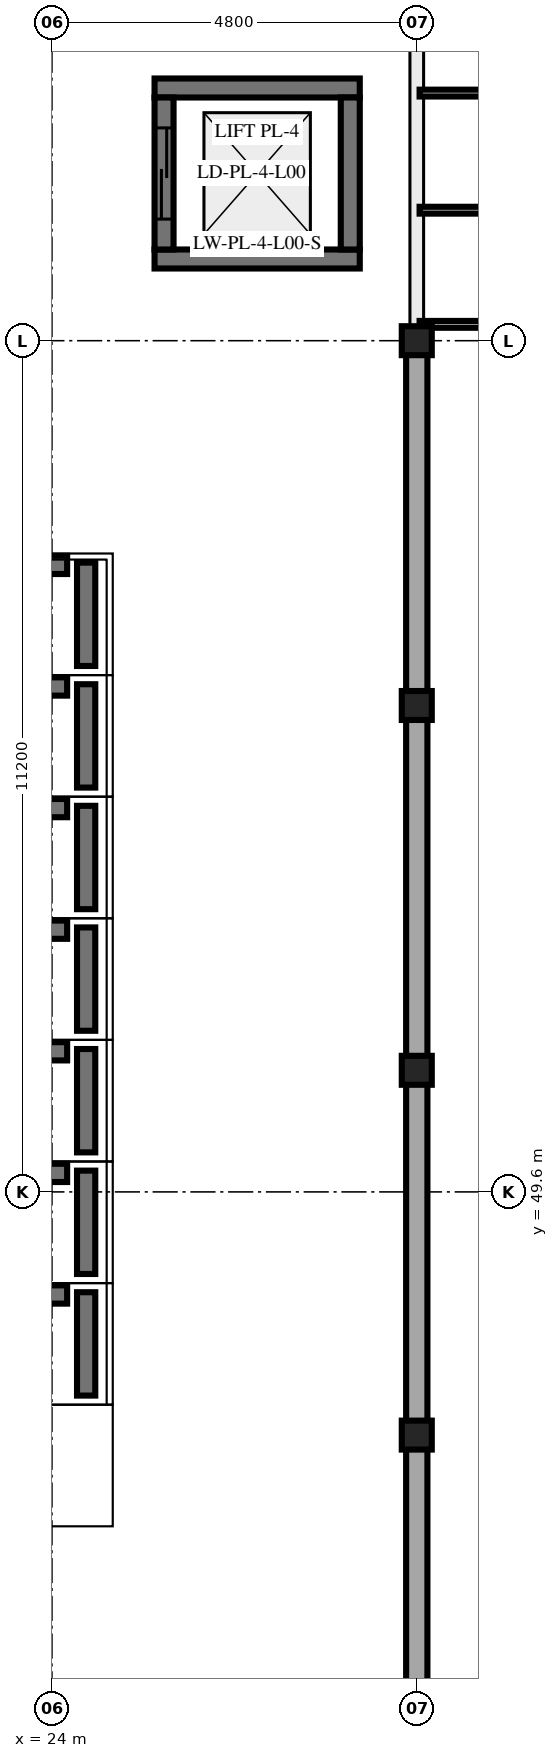
"""IFC4 building model, lengths in metres.
Left out: names, types, materials, properties, quantities, classifications, styles, units other than length and angle.
Written with IfcOpenShell. Run it as: python <this file> out.ifc"""

import sys

from ifc_helpers import new_model, si_unit, direction, frame, frame_2d, origin, origin_2d, place, context, subcontext, project, spatial, rectangle, i_section, extrude, element, fill, save


model = new_model("IFC4")
c1 = context("Model", 3, precision=1e-05, world=origin(), true_north=direction((0.0, 1.0)))
c2 = subcontext(c1, "Body", "Model", "MODEL_VIEW")
j1 = project(units=[si_unit("LENGTHUNIT", "METRE"), si_unit("PLANEANGLEUNIT", "RADIAN")], contexts=[c1])
p1 = place(None, origin())
s1 = spatial("IfcSite", under=j1, at=p1, CompositionType="ELEMENT")
p2 = place(p1, origin())
s2 = spatial("IfcBuilding", under=s1, at=p2, CompositionType="ELEMENT")
p3 = place(p2, origin())
s3 = spatial("IfcBuildingStorey", under=s2, at=p3, CompositionType="ELEMENT", Elevation=0.0)
for number, where, z_axis, x_axis in (
    (1, (28.8, 46.4, 0.0), (0.0, 0.0, 1.0), (1.0, 0.0, 0.0)),
    (2, (28.8, 51.2, 0.0), (0.0, 0.0, 1.0), (1.0, 0.0, 0.0)),
    (3, (28.8, 56.0, 0.0), (0.0, 0.0, 1.0), (1.0, 0.0, 0.0)),
    (4, (28.8, 60.8, 0.0), (0.0, 0.0, 1.0), (1.0, 0.0, 0.0)),
):
    element("IfcColumn", number, at=place(p3, frame(where, z_axis=z_axis, x_axis=x_axis)), inside=s3, PredefinedType="COLUMN", context=c2, shape_type="SweptSolid", body=[
        extrude(i_section(OverallWidth=0.395, OverallDepth=0.381, WebThickness=0.018, FlangeThickness=0.03, at=origin_2d()), origin(), (0.0, 0.0, 1.0), 5.1),
    ])
p4 = place(p3, frame((24.45, 46.92, 0.0), z_axis=(0.0, 0.0, 1.0), x_axis=(0.0, 1.0, 0.0)))
e5 = element("IfcWall", 5, at=p4, inside=s3, PredefinedType="SHEAR", context=c2, shape_type="SweptSolid", body=[
    extrude(rectangle(XDim=1.36, YDim=0.24, at=frame_2d((0.68, 0.0))), origin(), (0.0, 0.0, 1.0), 0.49),
])
p5 = place(p3, frame((4.6, 48.25, 0.0), z_axis=(0.0, 0.0, 1.0), x_axis=(1.0, 0.0, 0.0)))
e6 = element("IfcWall", 6, at=p5, inside=s3, PredefinedType="SHEAR", context=c2, shape_type="SweptSolid", body=[
    extrude(rectangle(XDim=19.6, YDim=0.24, at=frame_2d((9.8, 0.0))), origin(), (0.0, 0.0, 1.0), 0.49),
])
p6 = place(p3, frame((24.45, 48.52, 0.0), z_axis=(0.0, 0.0, 1.0), x_axis=(0.0, 1.0, 0.0)))
e7 = element("IfcWall", 7, at=p6, inside=s3, PredefinedType="SHEAR", context=c2, shape_type="SweptSolid", body=[
    extrude(rectangle(XDim=1.36, YDim=0.24, at=frame_2d((0.68, 0.0))), origin(), (0.0, 0.0, 1.0), 0.81),
])
p7 = place(p3, frame((4.6, 49.85, 0.0), z_axis=(0.0, 0.0, 1.0), x_axis=(1.0, 0.0, 0.0)))
e8 = element("IfcWall", 8, at=p7, inside=s3, PredefinedType="SHEAR", context=c2, shape_type="SweptSolid", body=[
    extrude(rectangle(XDim=19.6, YDim=0.24, at=frame_2d((9.8, 0.0))), origin(), (0.0, 0.0, 1.0), 0.81),
])
p8 = place(p3, frame((24.45, 50.12, 0.0), z_axis=(0.0, 0.0, 1.0), x_axis=(0.0, 1.0, 0.0)))
e9 = element("IfcWall", 9, at=p8, inside=s3, PredefinedType="SHEAR", context=c2, shape_type="SweptSolid", body=[
    extrude(rectangle(XDim=1.36, YDim=0.24, at=frame_2d((0.68, 0.0))), origin(), (0.0, 0.0, 1.0), 1.13),
])
p9 = place(p3, frame((4.6, 51.45, 0.0), z_axis=(0.0, 0.0, 1.0), x_axis=(1.0, 0.0, 0.0)))
e10 = element("IfcWall", 10, at=p9, inside=s3, PredefinedType="SHEAR", context=c2, shape_type="SweptSolid", body=[
    extrude(rectangle(XDim=19.6, YDim=0.24, at=frame_2d((9.8, 0.0))), origin(), (0.0, 0.0, 1.0), 1.13),
])
p10 = place(p3, frame((24.45, 51.72, 0.0), z_axis=(0.0, 0.0, 1.0), x_axis=(0.0, 1.0, 0.0)))
e11 = element("IfcWall", 11, at=p10, inside=s3, PredefinedType="SHEAR", context=c2, shape_type="SweptSolid", body=[
    extrude(rectangle(XDim=1.36, YDim=0.24, at=frame_2d((0.68, 0.0))), origin(), (0.0, 0.0, 1.0), 1.45),
])
p11 = place(p3, frame((4.6, 53.05, 0.0), z_axis=(0.0, 0.0, 1.0), x_axis=(1.0, 0.0, 0.0)))
e12 = element("IfcWall", 12, at=p11, inside=s3, PredefinedType="SHEAR", context=c2, shape_type="SweptSolid", body=[
    extrude(rectangle(XDim=19.6, YDim=0.24, at=frame_2d((9.8, 0.0))), origin(), (0.0, 0.0, 1.0), 1.45),
])
p12 = place(p3, frame((24.45, 53.32, 0.0), z_axis=(0.0, 0.0, 1.0), x_axis=(0.0, 1.0, 0.0)))
e13 = element("IfcWall", 13, at=p12, inside=s3, PredefinedType="SHEAR", context=c2, shape_type="SweptSolid", body=[
    extrude(rectangle(XDim=1.36, YDim=0.24, at=frame_2d((0.68, 0.0))), origin(), (0.0, 0.0, 1.0), 1.77),
])
p13 = place(p3, frame((4.6, 54.65, 0.0), z_axis=(0.0, 0.0, 1.0), x_axis=(1.0, 0.0, 0.0)))
e14 = element("IfcWall", 14, at=p13, inside=s3, PredefinedType="SHEAR", context=c2, shape_type="SweptSolid", body=[
    extrude(rectangle(XDim=19.6, YDim=0.24, at=frame_2d((9.8, 0.0))), origin(), (0.0, 0.0, 1.0), 1.77),
])
p14 = place(p3, frame((24.45, 54.92, 0.0), z_axis=(0.0, 0.0, 1.0), x_axis=(0.0, 1.0, 0.0)))
e15 = element("IfcWall", 15, at=p14, inside=s3, PredefinedType="SHEAR", context=c2, shape_type="SweptSolid", body=[
    extrude(rectangle(XDim=1.36, YDim=0.24, at=frame_2d((0.68, 0.0))), origin(), (0.0, 0.0, 1.0), 2.09),
])
p15 = place(p3, frame((4.6, 56.25, 0.0), z_axis=(0.0, 0.0, 1.0), x_axis=(1.0, 0.0, 0.0)))
e16 = element("IfcWall", 16, at=p15, inside=s3, PredefinedType="SHEAR", context=c2, shape_type="SweptSolid", body=[
    extrude(rectangle(XDim=19.6, YDim=0.24, at=frame_2d((9.8, 0.0))), origin(), (0.0, 0.0, 1.0), 2.09),
])
p16 = place(p3, frame((24.45, 56.52, 0.0), z_axis=(0.0, 0.0, 1.0), x_axis=(0.0, 1.0, 0.0)))
e17 = element("IfcWall", 17, at=p16, inside=s3, PredefinedType="SHEAR", context=c2, shape_type="SweptSolid", body=[
    extrude(rectangle(XDim=1.36, YDim=0.24, at=frame_2d((0.68, 0.0))), origin(), (0.0, 0.0, 1.0), 2.41),
])
p17 = place(p3, frame((4.6, 57.85, 0.0), z_axis=(0.0, 0.0, 1.0), x_axis=(1.0, 0.0, 0.0)))
e18 = element("IfcWall", 18, at=p17, inside=s3, PredefinedType="SHEAR", context=c2, shape_type="SweptSolid", body=[
    extrude(rectangle(XDim=19.6, YDim=0.24, at=frame_2d((9.8, 0.0))), origin(), (0.0, 0.0, 1.0), 2.41),
])
for number, where, z_axis, x_axis in (
    (19, (28.05, 61.875, 0.0), (0.0, 0.0, 1.0), (-1.0, 0.0, 0.0)),
    (20, (25.35, 64.125, 0.0), (0.0, 0.0, 1.0), (1.0, 0.0, 0.0)),
):
    element("IfcWall", number, at=place(p3, frame(where, z_axis=z_axis, x_axis=x_axis)), inside=s3, PredefinedType="SHEAR", context=c2, shape_type="SweptSolid", body=[
        extrude(rectangle(XDim=2.7, YDim=0.25, at=frame_2d((1.35, 0.0))), origin(), (0.0, 0.0, 1.0), 4.88),
    ])
p18 = place(p3, frame((25.475, 62.0, 0.0), z_axis=(0.0, 0.0, 1.0), x_axis=(0.0, 1.0, 0.0)))
e21 = element("IfcWall", 21, at=p18, inside=s3, PredefinedType="SHEAR", context=c2, shape_type="SweptSolid", body=[
    extrude(rectangle(XDim=2.0, YDim=0.25, at=frame_2d((1.0, 0.0))), origin(), (0.0, 0.0, 1.0), 4.88),
])
p19 = place(p18, frame((0.4, 0.0, 0.0)))
e22 = element("IfcOpeningElement", 22, at=p19, cuts=e21, PredefinedType="OPENING", context=c2, shape_type="SweptSolid", body=[
    extrude(rectangle(XDim=1.2, YDim=2.2, at=frame_2d((0.6, 1.1))), frame((0.0, 0.135, 0.0), z_axis=(0.0, -1.0, 0.0), x_axis=(1.0, 0.0, 0.0)), (0.0, 0.0, 1.0), 0.27),
])
p20 = place(p3, frame((27.925, 64.0, 0.0), z_axis=(0.0, 0.0, 1.0), x_axis=(0.0, -1.0, 0.0)))
e23 = element("IfcWall", 23, at=p20, inside=s3, PredefinedType="SHEAR", context=c2, shape_type="SweptSolid", body=[
    extrude(rectangle(XDim=2.0, YDim=0.25, at=frame_2d((1.0, 0.0))), origin(), (0.0, 0.0, 1.0), 4.88),
])
p21 = place(p3, frame((28.8, 46.485, 0.0), z_axis=(0.0, 0.0, 1.0), x_axis=(0.0, -1.0, 0.0)))
e24 = element("IfcWall", 24, at=p21, inside=s3, PredefinedType="SOLIDWALL", context=c2, shape_type="SweptSolid", body=[
    extrude(rectangle(XDim=4.97, YDim=0.28, at=frame_2d((2.485, 0.0))), origin(), (0.0, 0.0, 1.0), 4.322),
])
for number, where, z_axis, x_axis in (
    (25, (28.8, 51.285, 0.0), (0.0, 0.0, 1.0), (0.0, -1.0, 0.0)),
    (26, (28.8, 56.085, 0.0), (0.0, 0.0, 1.0), (0.0, -1.0, 0.0)),
    (27, (28.8, 60.885, 0.0), (0.0, 0.0, 1.0), (0.0, -1.0, 0.0)),
):
    element("IfcWall", number, at=place(p3, frame(where, z_axis=z_axis, x_axis=x_axis)), inside=s3, PredefinedType="SOLIDWALL", context=c2, shape_type="SweptSolid", body=[
        extrude(rectangle(XDim=4.97, YDim=0.28, at=frame_2d((2.485, 0.0))), origin(), (0.0, 0.0, 1.0), 4.322),
    ])
p22 = place(p19, origin())
e28 = element("IfcDoor", 28, at=p22, inside=s3, OperationType="DOUBLE_DOOR_SLIDING", PredefinedType="DOOR", context=c2, shape_type="SweptSolid", body=[
    extrude(rectangle(XDim=1.2, YDim=2.2, at=frame_2d((0.6, 1.1))), frame((0.0, 0.025, 0.0), z_axis=(0.0, -1.0, 0.0), x_axis=(1.0, 0.0, 0.0)), (0.0, 0.0, 1.0), 0.05),
])
fill(e22, e28)
save(model, sys.argv[1])
